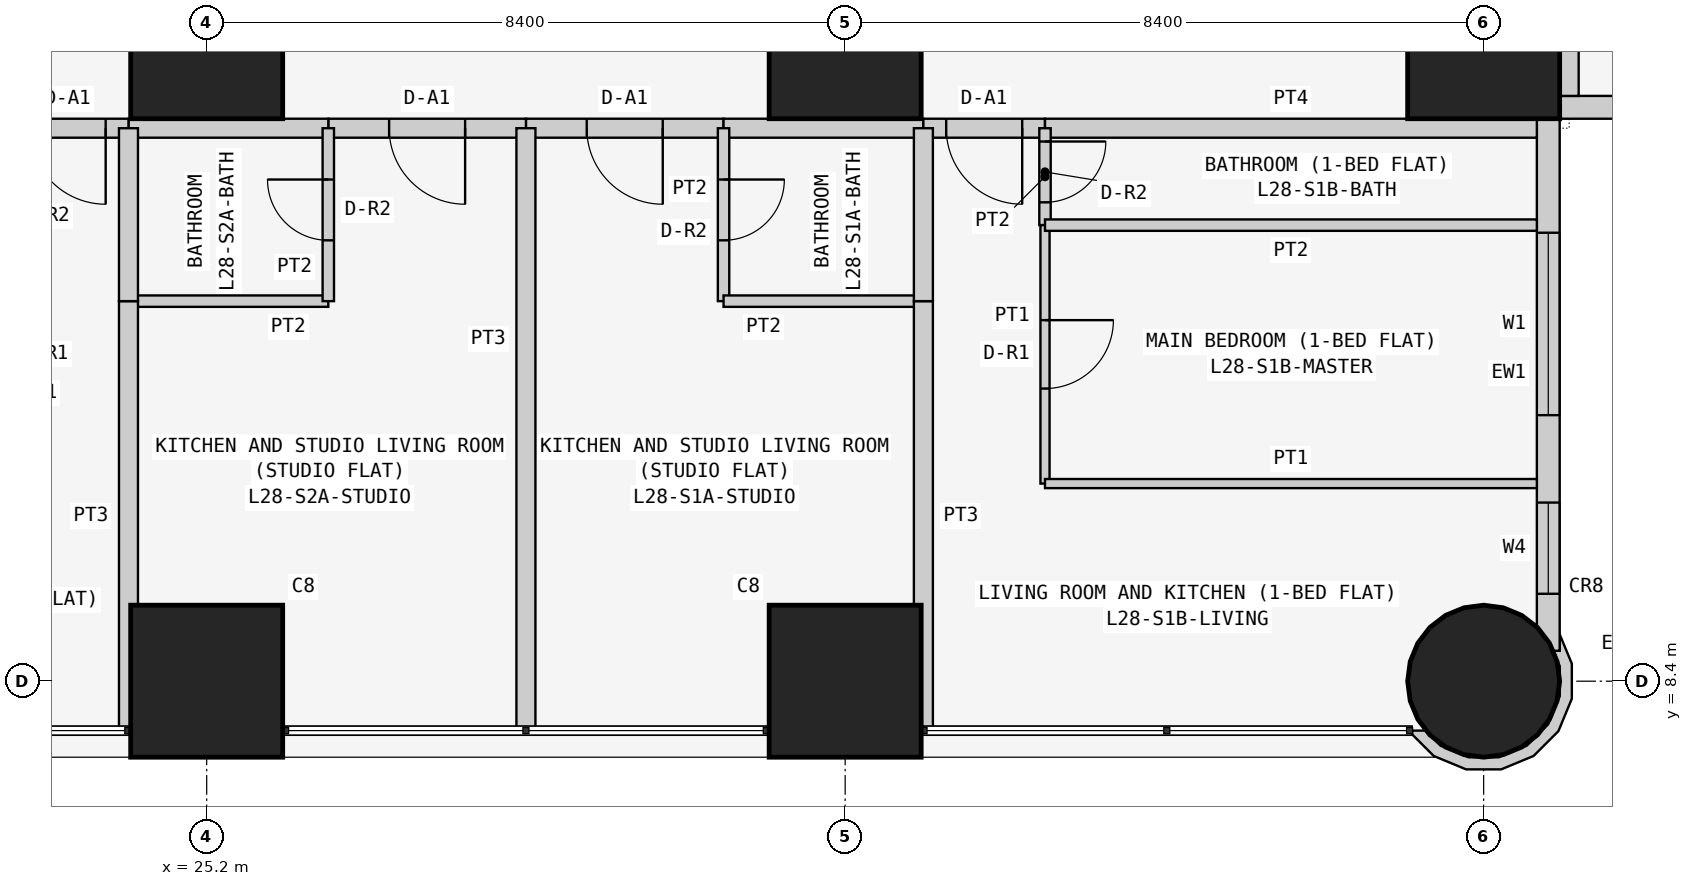
"""IFC4 building model, lengths in metres.
Left out: names, types, materials, properties, quantities, classifications, styles, units other than length and angle.
Written with IfcOpenShell. Run it as: python <this file> out.ifc"""

import sys

from ifc_helpers import new_model, si_unit, direction, frame, frame_2d, origin, origin_2d, place, context, subcontext, project, spatial, polyline, rectangle, circle, outline, extrude, element, fill, save


model = new_model("IFC4")
c1 = context("Model", 3, precision=1e-05, world=origin(), true_north=direction((0.0, 1.0)))
c2 = subcontext(c1, "Body", "Model", "MODEL_VIEW")
j1 = project(units=[si_unit("LENGTHUNIT", "METRE"), si_unit("PLANEANGLEUNIT", "RADIAN")], contexts=[c1])
p1 = place(None, origin())
s1 = spatial("IfcSite", under=j1, at=p1, CompositionType="ELEMENT")
p2 = place(p1, origin())
s2 = spatial("IfcBuilding", under=s1, at=p2, CompositionType="ELEMENT")
p3 = place(p2, frame((0.0, 0.0, 112.5)))
s3 = spatial("IfcBuildingStorey", under=s2, at=p3, CompositionType="ELEMENT", Elevation=112.5)
for number, where, z_axis, x_axis in (
    (1, (25.2, 8.4, 0.0), (0.0, 0.0, 1.0), (1.0, 0.0, 0.0)),
    (2, (25.2, 16.8, 0.0), (0.0, 0.0, 1.0), (1.0, 0.0, 0.0)),
    (3, (33.6, 8.4, 0.0), (0.0, 0.0, 1.0), (1.0, 0.0, 0.0)),
    (4, (33.6, 16.8, 0.0), (0.0, 0.0, 1.0), (1.0, 0.0, 0.0)),
):
    element("IfcColumn", number, at=place(p3, frame(where, z_axis=z_axis, x_axis=x_axis)), inside=s3, PredefinedType="COLUMN", context=c2, shape_type="SweptSolid", body=[
        extrude(rectangle(XDim=2.0, YDim=2.0, at=origin_2d()), origin(), (0.0, 0.0, 1.0), 3.6),
    ])
p4 = place(p3, frame((42.0, 8.4, 0.0), z_axis=(0.0, 0.0, 1.0), x_axis=(1.0, 0.0, 0.0)))
e5 = element("IfcColumn", 5, at=p4, inside=s3, PredefinedType="COLUMN", context=c2, shape_type="SweptSolid", body=[
    extrude(circle(Radius=1.0, at=origin_2d()), origin(), (0.0, 0.0, 1.0), 3.6),
])
p5 = place(p3, frame((42.0, 16.8, 0.0), z_axis=(0.0, 0.0, 1.0), x_axis=(1.0, 0.0, 0.0)))
e6 = element("IfcColumn", 6, at=p5, inside=s3, PredefinedType="COLUMN", context=c2, shape_type="SweptSolid", body=[
    extrude(rectangle(XDim=2.0, YDim=2.0, at=origin_2d()), origin(), (0.0, 0.0, 1.0), 3.6),
])
p6 = place(p3, frame((42.85, 8.8, 0.0), z_axis=(0.0, 0.0, 1.0), x_axis=(0.0, 1.0, 0.0)))
e7 = element("IfcWall", 7, at=p6, inside=s3, PredefinedType="SOLIDWALL", context=c2, shape_type="SweptSolid", body=[
    extrude(rectangle(XDim=7.3, YDim=0.3, at=frame_2d((3.65, 0.0))), origin(), (0.0, 0.0, 1.0), 3.45),
])
p7 = place(p6, frame((3.1, 0.0, 0.9)))
e8 = element("IfcOpeningElement", 8, at=p7, cuts=e7, PredefinedType="OPENING", context=c2, shape_type="SweptSolid", body=[
    extrude(rectangle(XDim=2.4, YDim=1.5, at=frame_2d((1.2, 0.75))), frame((0.0, 0.16, 0.0), z_axis=(0.0, -1.0, 0.0), x_axis=(1.0, 0.0, 0.0)), (0.0, 0.0, 1.0), 0.32),
])
p8 = place(p6, frame((0.75, 0.0, 0.9)))
e9 = element("IfcOpeningElement", 9, at=p8, cuts=e7, PredefinedType="OPENING", context=c2, shape_type="SweptSolid", body=[
    extrude(rectangle(XDim=1.2, YDim=1.5, at=frame_2d((0.6, 0.75))), frame((0.0, 0.16, 0.0), z_axis=(0.0, -1.0, 0.0), x_axis=(1.0, 0.0, 0.0)), (0.0, 0.0, 1.0), 0.32),
])
p9 = place(p3, frame((43.0, 15.95, 0.0), z_axis=(0.0, 0.0, 1.0), x_axis=(1.0, 0.0, 0.0)))
e10 = element("IfcWall", 10, at=p9, inside=s3, PredefinedType="SOLIDWALL", context=c2, shape_type="SweptSolid", body=[
    extrude(rectangle(XDim=15.4, YDim=0.3, at=frame_2d((7.7, 0.0))), origin(), (0.0, 0.0, 1.0), 3.45),
])
p10 = place(p9, frame((1.2, 0.0, 0.9)))
e11 = element("IfcOpeningElement", 11, at=p10, cuts=e10, PredefinedType="OPENING", context=c2, shape_type="SweptSolid", body=[
    extrude(rectangle(XDim=1.8, YDim=1.5, at=frame_2d((0.9, 0.75))), frame((0.0, 0.16, 0.0), z_axis=(0.0, -1.0, 0.0), x_axis=(1.0, 0.0, 0.0)), (0.0, 0.0, 1.0), 0.32),
])
p11 = place(p9, frame((4.95, 0.0, 1.5)))
e12 = element("IfcOpeningElement", 12, at=p11, cuts=e10, PredefinedType="OPENING", context=c2, shape_type="SweptSolid", body=[
    extrude(rectangle(XDim=0.9, YDim=0.7, at=frame_2d((0.45, 0.35))), frame((0.0, 0.16, 0.0), z_axis=(0.0, -1.0, 0.0), x_axis=(1.0, 0.0, 0.0)), (0.0, 0.0, 1.0), 0.32),
])
p12 = place(p9, frame((8.5, 0.0, 0.9)))
e13 = element("IfcOpeningElement", 13, at=p12, cuts=e10, PredefinedType="OPENING", context=c2, shape_type="SweptSolid", body=[
    extrude(rectangle(XDim=1.8, YDim=1.5, at=frame_2d((0.9, 0.75))), frame((0.0, 0.16, 0.0), z_axis=(0.0, -1.0, 0.0), x_axis=(1.0, 0.0, 0.0)), (0.0, 0.0, 1.0), 0.32),
])
p13 = place(p9, frame((12.5, 0.0, 0.0)))
e14 = element("IfcOpeningElement", 14, at=p13, cuts=e10, PredefinedType="OPENING", context=c2, shape_type="SweptSolid", body=[
    extrude(rectangle(XDim=0.9, YDim=2.4, at=frame_2d((0.45, 1.2))), frame((0.0, 0.16, 0.0), z_axis=(0.0, -1.0, 0.0), x_axis=(1.0, 0.0, 0.0)), (0.0, 0.0, 1.0), 0.32),
])
p14 = place(p9, frame((13.5, 0.0, 0.9)))
e15 = element("IfcOpeningElement", 15, at=p14, cuts=e10, PredefinedType="OPENING", context=c2, shape_type="SweptSolid", body=[
    extrude(rectangle(XDim=1.2, YDim=1.5, at=frame_2d((0.6, 0.75))), frame((0.0, 0.16, 0.0), z_axis=(0.0, -1.0, 0.0), x_axis=(1.0, 0.0, 0.0)), (0.0, 0.0, 1.0), 0.32),
])
p15 = place(p3, frame((41.132, 7.757, 0.0), z_axis=(0.0, 0.0, 1.0), x_axis=(0.555974394895, -0.831199417842, 0.0)))
e16 = element("IfcWall", 16, at=p15, inside=s3, PredefinedType="SOLIDWALL", context=c2, shape_type="SweptSolid", body=[
    extrude(outline(polyline([(0.171, 2.132), (0.113, 2.066), (0.339, 2.021), (0.67, 1.8), (0.891, 1.469), (0.968, 1.078), (0.89, 0.688), (0.669, 0.357), (0.338, 0.136), (0.062, 0.081), (-0.036, -0.066), (0.005, -0.093), (0.4, -0.014), (0.784, 0.242), (1.04, 0.626), (1.13, 1.078), (1.041, 1.531), (0.784, 1.915), (0.401, 2.171), (-0.009, 2.253), (0.171, 2.132)])), origin(), (0.0, 0.0, 1.0), 3.45),
])
p16 = place(p3, frame((43.125, 22.971, 0.0), z_axis=(0.0, 0.0, 1.0), x_axis=(0.0, -1.0, 0.0)))
e17 = element("IfcWall", 17, at=p16, inside=s3, PredefinedType="PARTITIONING", context=c2, shape_type="SweptSolid", body=[
    extrude(rectangle(XDim=6.871, YDim=0.25, at=frame_2d((3.436, 0.0))), origin(), (0.0, 0.0, 1.0), 3.45),
])
p17 = place(p3, frame((32.0, 15.675, 0.0), z_axis=(0.0, 0.0, 1.0), x_axis=(-1.0, 0.0, 0.0)))
e18 = element("IfcWall", 18, at=p17, inside=s3, PredefinedType="PARTITIONING", context=c2, shape_type="SweptSolid", body=[
    extrude(rectangle(XDim=2.6, YDim=0.25, at=frame_2d((1.3, 0.0))), origin(), (0.0, 0.0, 1.0), 3.45),
])
p18 = place(p17, frame((0.8, 0.0, 0.0)))
e19 = element("IfcOpeningElement", 19, at=p18, cuts=e18, PredefinedType="OPENING", context=c2, shape_type="SweptSolid", body=[
    extrude(rectangle(XDim=1.0, YDim=2.1, at=frame_2d((0.5, 1.05))), frame((0.0, 0.135, 0.0), z_axis=(0.0, -1.0, 0.0), x_axis=(1.0, 0.0, 0.0)), (0.0, 0.0, 1.0), 0.27),
])
p19 = place(p3, frame((34.629, 15.675, 0.0), z_axis=(0.0, 0.0, 1.0), x_axis=(-1.0, 0.0, 0.0)))
e20 = element("IfcWall", 20, at=p19, inside=s3, PredefinedType="PARTITIONING", context=c2, shape_type="SweptSolid", body=[
    extrude(rectangle(XDim=2.629, YDim=0.25, at=frame_2d((1.314, 0.0))), origin(), (0.0, 0.0, 1.0), 3.45),
])
p20 = place(p3, frame((36.229, 15.675, 0.0), z_axis=(0.0, 0.0, 1.0), x_axis=(-1.0, 0.0, 0.0)))
e21 = element("IfcWall", 21, at=p20, inside=s3, PredefinedType="PARTITIONING", context=c2, shape_type="SweptSolid", body=[
    extrude(rectangle(XDim=1.6, YDim=0.25, at=frame_2d((0.8, 0.0))), origin(), (0.0, 0.0, 1.0), 3.45),
])
p21 = place(p20, frame((0.3, 0.0, 0.0)))
e22 = element("IfcOpeningElement", 22, at=p21, cuts=e21, PredefinedType="OPENING", context=c2, shape_type="SweptSolid", body=[
    extrude(rectangle(XDim=1.0, YDim=2.1, at=frame_2d((0.5, 1.05))), frame((0.0, 0.135, 0.0), z_axis=(0.0, -1.0, 0.0), x_axis=(1.0, 0.0, 0.0)), (0.0, 0.0, 1.0), 0.27),
])
p22 = place(p3, frame((42.7, 15.675, 0.0), z_axis=(0.0, 0.0, 1.0), x_axis=(-1.0, 0.0, 0.0)))
e23 = element("IfcWall", 23, at=p22, inside=s3, PredefinedType="PARTITIONING", context=c2, shape_type="SweptSolid", body=[
    extrude(rectangle(XDim=6.471, YDim=0.25, at=frame_2d((3.235, 0.0))), origin(), (0.0, 0.0, 1.0), 3.45),
])
p23 = place(p3, frame((29.4, 15.675, 0.0), z_axis=(0.0, 0.0, 1.0), x_axis=(-1.0, 0.0, 0.0)))
e24 = element("IfcWall", 24, at=p23, inside=s3, PredefinedType="PARTITIONING", context=c2, shape_type="SweptSolid", body=[
    extrude(rectangle(XDim=2.6, YDim=0.25, at=frame_2d((1.3, 0.0))), origin(), (0.0, 0.0, 1.0), 3.45),
])
p24 = place(p23, frame((0.8, 0.0, 0.0)))
e25 = element("IfcOpeningElement", 25, at=p24, cuts=e24, PredefinedType="OPENING", context=c2, shape_type="SweptSolid", body=[
    extrude(rectangle(XDim=1.0, YDim=2.1, at=frame_2d((0.5, 1.05))), frame((0.0, 0.135, 0.0), z_axis=(0.0, -1.0, 0.0), x_axis=(1.0, 0.0, 0.0)), (0.0, 0.0, 1.0), 0.27),
])
p25 = place(p3, frame((26.8, 15.675, 0.0), z_axis=(0.0, 0.0, 1.0), x_axis=(-1.0, 0.0, 0.0)))
e26 = element("IfcWall", 26, at=p25, inside=s3, PredefinedType="PARTITIONING", context=c2, shape_type="SweptSolid", body=[
    extrude(rectangle(XDim=2.629, YDim=0.25, at=frame_2d((1.314, 0.0))), origin(), (0.0, 0.0, 1.0), 3.45),
])
p26 = place(p3, frame((24.171, 15.675, 0.0), z_axis=(0.0, 0.0, 1.0), x_axis=(-1.0, 0.0, 0.0)))
e27 = element("IfcWall", 27, at=p26, inside=s3, PredefinedType="PARTITIONING", context=c2, shape_type="SweptSolid", body=[
    extrude(rectangle(XDim=1.6, YDim=0.25, at=frame_2d((0.8, 0.0))), origin(), (0.0, 0.0, 1.0), 3.45),
])
p27 = place(p26, frame((0.3, 0.0, 0.0)))
e28 = element("IfcOpeningElement", 28, at=p27, cuts=e27, PredefinedType="OPENING", context=c2, shape_type="SweptSolid", body=[
    extrude(rectangle(XDim=1.0, YDim=2.1, at=frame_2d((0.5, 1.05))), frame((0.0, 0.135, 0.0), z_axis=(0.0, -1.0, 0.0), x_axis=(1.0, 0.0, 0.0)), (0.0, 0.0, 1.0), 0.27),
])
p28 = place(p3, frame((32.0, 15.675, 0.0), z_axis=(0.0, 0.0, 1.0), x_axis=(0.0, -1.0, 0.0)))
e29 = element("IfcWall", 29, at=p28, inside=s3, PredefinedType="PARTITIONING", context=c2, shape_type="SweptSolid", body=[
    extrude(rectangle(XDim=2.275, YDim=0.15, at=frame_2d((1.138, 0.0))), origin(), (0.0, 0.0, 1.0), 3.45),
])
p29 = place(p28, frame((0.675, 0.0, 0.0)))
e30 = element("IfcOpeningElement", 30, at=p29, cuts=e29, PredefinedType="OPENING", context=c2, shape_type="SweptSolid", body=[
    extrude(rectangle(XDim=0.8, YDim=2.1, at=frame_2d((0.4, 1.05))), frame((0.0, 0.085, 0.0), z_axis=(0.0, -1.0, 0.0), x_axis=(1.0, 0.0, 0.0)), (0.0, 0.0, 1.0), 0.17),
])
p30 = place(p3, frame((32.0, 13.4, 0.0), z_axis=(0.0, 0.0, 1.0), x_axis=(1.0, 0.0, 0.0)))
e31 = element("IfcWall", 31, at=p30, inside=s3, PredefinedType="PARTITIONING", context=c2, shape_type="SweptSolid", body=[
    extrude(rectangle(XDim=2.629, YDim=0.15, at=frame_2d((1.314, 0.0))), origin(), (0.0, 0.0, 1.0), 3.45),
])
p31 = place(p3, frame((34.629, 13.4, 0.0), z_axis=(0.0, 0.0, 1.0), x_axis=(0.0, -1.0, 0.0)))
e32 = element("IfcWall", 32, at=p31, inside=s3, PredefinedType="PARTITIONING", context=c2, shape_type="SweptSolid", body=[
    extrude(rectangle(XDim=5.65, YDim=0.25, at=frame_2d((2.825, 0.0))), origin(), (0.0, 0.0, 1.0), 3.45),
])
p32 = place(p3, frame((29.4, 7.75, 0.0), z_axis=(0.0, 0.0, 1.0), x_axis=(0.0, 1.0, 0.0)))
e33 = element("IfcWall", 33, at=p32, inside=s3, PredefinedType="PARTITIONING", context=c2, shape_type="SweptSolid", body=[
    extrude(rectangle(XDim=7.925, YDim=0.25, at=frame_2d((3.962, 0.0))), origin(), (0.0, 0.0, 1.0), 2.848),
])
p33 = place(p3, frame((34.629, 13.4, 0.0), z_axis=(0.0, 0.0, 1.0), x_axis=(0.0, 1.0, 0.0)))
e34 = element("IfcWall", 34, at=p33, inside=s3, PredefinedType="PARTITIONING", context=c2, shape_type="SweptSolid", body=[
    extrude(rectangle(XDim=2.275, YDim=0.25, at=frame_2d((1.138, 0.0))), origin(), (0.0, 0.0, 1.0), 3.45),
])
p34 = place(p3, frame((36.229, 15.675, 0.0), z_axis=(0.0, 0.0, 1.0), x_axis=(0.0, -1.0, 0.0)))
e35 = element("IfcWall", 35, at=p34, inside=s3, PredefinedType="PARTITIONING", context=c2, shape_type="SweptSolid", body=[
    extrude(rectangle(XDim=1.275, YDim=0.15, at=frame_2d((0.638, 0.0))), origin(), (0.0, 0.0, 1.0), 3.45),
])
p35 = place(p34, frame((0.175, 0.0, 0.0)))
e36 = element("IfcOpeningElement", 36, at=p35, cuts=e35, PredefinedType="OPENING", context=c2, shape_type="SweptSolid", body=[
    extrude(rectangle(XDim=0.8, YDim=2.1, at=frame_2d((0.4, 1.05))), frame((0.0, 0.085, 0.0), z_axis=(0.0, -1.0, 0.0), x_axis=(1.0, 0.0, 0.0)), (0.0, 0.0, 1.0), 0.17),
])
p36 = place(p3, frame((36.229, 14.4, 0.0), z_axis=(0.0, 0.0, 1.0), x_axis=(0.0, -1.0, 0.0)))
e37 = element("IfcWall", 37, at=p36, inside=s3, PredefinedType="PARTITIONING", context=c2, shape_type="SweptSolid", body=[
    extrude(rectangle(XDim=3.4, YDim=0.12, at=frame_2d((1.7, 0.0))), origin(), (0.0, 0.0, 1.0), 3.45),
])
p37 = place(p36, frame((1.25, 0.0, 0.0)))
e38 = element("IfcOpeningElement", 38, at=p37, cuts=e37, PredefinedType="OPENING", context=c2, shape_type="SweptSolid", body=[
    extrude(rectangle(XDim=0.9, YDim=2.1, at=frame_2d((0.45, 1.05))), frame((0.0, 0.07, 0.0), z_axis=(0.0, -1.0, 0.0), x_axis=(1.0, 0.0, 0.0)), (0.0, 0.0, 1.0), 0.14),
])
p38 = place(p3, frame((36.229, 11.0, 0.0), z_axis=(0.0, 0.0, 1.0), x_axis=(1.0, 0.0, 0.0)))
e39 = element("IfcWall", 39, at=p38, inside=s3, PredefinedType="PARTITIONING", context=c2, shape_type="SweptSolid", body=[
    extrude(rectangle(XDim=6.471, YDim=0.12, at=frame_2d((3.235, 0.0))), origin(), (0.0, 0.0, 1.0), 3.45),
])
p39 = place(p3, frame((36.229, 14.4, 0.0), z_axis=(0.0, 0.0, 1.0), x_axis=(1.0, 0.0, 0.0)))
e40 = element("IfcWall", 40, at=p39, inside=s3, PredefinedType="PARTITIONING", context=c2, shape_type="SweptSolid", body=[
    extrude(rectangle(XDim=6.471, YDim=0.15, at=frame_2d((3.235, 0.0))), origin(), (0.0, 0.0, 1.0), 3.45),
])
p40 = place(p3, frame((24.171, 13.4, 0.0), z_axis=(0.0, 0.0, 1.0), x_axis=(1.0, 0.0, 0.0)))
e41 = element("IfcWall", 41, at=p40, inside=s3, PredefinedType="PARTITIONING", context=c2, shape_type="SweptSolid", body=[
    extrude(rectangle(XDim=2.629, YDim=0.15, at=frame_2d((1.314, 0.0))), origin(), (0.0, 0.0, 1.0), 3.45),
])
p41 = place(p3, frame((26.8, 13.4, 0.0), z_axis=(0.0, 0.0, 1.0), x_axis=(0.0, 1.0, 0.0)))
e42 = element("IfcWall", 42, at=p41, inside=s3, PredefinedType="PARTITIONING", context=c2, shape_type="SweptSolid", body=[
    extrude(rectangle(XDim=2.275, YDim=0.15, at=frame_2d((1.138, 0.0))), origin(), (0.0, 0.0, 1.0), 3.45),
])
p42 = place(p41, frame((0.8, 0.0, 0.0)))
e43 = element("IfcOpeningElement", 43, at=p42, cuts=e42, PredefinedType="OPENING", context=c2, shape_type="SweptSolid", body=[
    extrude(rectangle(XDim=0.8, YDim=2.1, at=frame_2d((0.4, 1.05))), frame((0.0, 0.085, 0.0), z_axis=(0.0, -1.0, 0.0), x_axis=(1.0, 0.0, 0.0)), (0.0, 0.0, 1.0), 0.17),
])
p43 = place(p3, frame((24.171, 7.75, 0.0), z_axis=(0.0, 0.0, 1.0), x_axis=(0.0, 1.0, 0.0)))
e44 = element("IfcWall", 44, at=p43, inside=s3, PredefinedType="PARTITIONING", context=c2, shape_type="SweptSolid", body=[
    extrude(rectangle(XDim=5.65, YDim=0.25, at=frame_2d((2.825, 0.0))), origin(), (0.0, 0.0, 1.0), 3.45),
])
p44 = place(p3, frame((24.171, 13.4, 0.0), z_axis=(0.0, 0.0, 1.0), x_axis=(0.0, 1.0, 0.0)))
e45 = element("IfcWall", 45, at=p44, inside=s3, PredefinedType="PARTITIONING", context=c2, shape_type="SweptSolid", body=[
    extrude(rectangle(XDim=2.275, YDim=0.25, at=frame_2d((1.138, 0.0))), origin(), (0.0, 0.0, 1.0), 3.45),
])
p45 = place(p7, origin())
e46 = element("IfcWindow", 46, at=p45, inside=s3, PartitioningType="SINGLE_PANEL", PredefinedType="WINDOW", context=c2, shape_type="SweptSolid", body=[
    extrude(rectangle(XDim=2.4, YDim=1.5, at=frame_2d((1.2, 0.75))), frame((0.0, 0.03, 0.0), z_axis=(0.0, -1.0, 0.0), x_axis=(1.0, 0.0, 0.0)), (0.0, 0.0, 1.0), 0.06),
])
fill(e8, e46)
p46 = place(p8, origin())
e47 = element("IfcWindow", 47, at=p46, inside=s3, PartitioningType="SINGLE_PANEL", PredefinedType="WINDOW", context=c2, shape_type="SweptSolid", body=[
    extrude(rectangle(XDim=1.2, YDim=1.5, at=frame_2d((0.6, 0.75))), frame((0.0, 0.03, 0.0), z_axis=(0.0, -1.0, 0.0), x_axis=(1.0, 0.0, 0.0)), (0.0, 0.0, 1.0), 0.06),
])
fill(e9, e47)
p47 = place(p18, origin())
e48 = element("IfcDoor", 48, at=p47, inside=s3, OperationType="SINGLE_SWING_LEFT", PredefinedType="DOOR", context=c2, shape_type="SweptSolid", body=[
    extrude(rectangle(XDim=1.0, YDim=2.1, at=frame_2d((0.5, 1.05))), frame((0.0, 0.025, 0.0), z_axis=(0.0, -1.0, 0.0), x_axis=(1.0, 0.0, 0.0)), (0.0, 0.0, 1.0), 0.05),
])
fill(e19, e48)
p48 = place(p29, origin())
e49 = element("IfcDoor", 49, at=p48, inside=s3, OperationType="SINGLE_SWING_LEFT", PredefinedType="DOOR", context=c2, shape_type="SweptSolid", body=[
    extrude(rectangle(XDim=0.8, YDim=2.1, at=frame_2d((0.4, 1.05))), frame((0.0, 0.025, 0.0), z_axis=(0.0, -1.0, 0.0), x_axis=(1.0, 0.0, 0.0)), (0.0, 0.0, 1.0), 0.05),
])
fill(e30, e49)
p49 = place(p21, origin())
e50 = element("IfcDoor", 50, at=p49, inside=s3, OperationType="SINGLE_SWING_LEFT", PredefinedType="DOOR", context=c2, shape_type="SweptSolid", body=[
    extrude(rectangle(XDim=1.0, YDim=2.1, at=frame_2d((0.5, 1.05))), frame((0.0, 0.025, 0.0), z_axis=(0.0, -1.0, 0.0), x_axis=(1.0, 0.0, 0.0)), (0.0, 0.0, 1.0), 0.05),
])
fill(e22, e50)
p50 = place(p35, origin())
e51 = element("IfcDoor", 51, at=p50, inside=s3, OperationType="SINGLE_SWING_LEFT", PredefinedType="DOOR", context=c2, shape_type="SweptSolid", body=[
    extrude(rectangle(XDim=0.8, YDim=2.1, at=frame_2d((0.4, 1.05))), frame((0.0, 0.025, 0.0), z_axis=(0.0, -1.0, 0.0), x_axis=(1.0, 0.0, 0.0)), (0.0, 0.0, 1.0), 0.05),
])
fill(e36, e51)
p51 = place(p37, origin())
e52 = element("IfcDoor", 52, at=p51, inside=s3, OperationType="SINGLE_SWING_LEFT", PredefinedType="DOOR", context=c2, shape_type="SweptSolid", body=[
    extrude(rectangle(XDim=0.9, YDim=2.1, at=frame_2d((0.45, 1.05))), frame((0.0, 0.025, 0.0), z_axis=(0.0, -1.0, 0.0), x_axis=(1.0, 0.0, 0.0)), (0.0, 0.0, 1.0), 0.05),
])
fill(e38, e52)
p52 = place(p24, origin())
e53 = element("IfcDoor", 53, at=p52, inside=s3, OperationType="SINGLE_SWING_LEFT", PredefinedType="DOOR", context=c2, shape_type="SweptSolid", body=[
    extrude(rectangle(XDim=1.0, YDim=2.1, at=frame_2d((0.5, 1.05))), frame((0.0, 0.025, 0.0), z_axis=(0.0, -1.0, 0.0), x_axis=(1.0, 0.0, 0.0)), (0.0, 0.0, 1.0), 0.05),
])
fill(e25, e53)
p53 = place(p42, origin())
e54 = element("IfcDoor", 54, at=p53, inside=s3, OperationType="SINGLE_SWING_RIGHT", PredefinedType="DOOR", context=c2, shape_type="SweptSolid", body=[
    extrude(rectangle(XDim=0.8, YDim=2.1, at=frame_2d((0.4, 1.05))), frame((0.0, 0.025, 0.0), z_axis=(0.0, -1.0, 0.0), x_axis=(1.0, 0.0, 0.0)), (0.0, 0.0, 1.0), 0.05),
])
fill(e43, e54)
p54 = place(p27, origin())
e55 = element("IfcDoor", 55, at=p54, inside=s3, OperationType="SINGLE_SWING_LEFT", PredefinedType="DOOR", context=c2, shape_type="SweptSolid", body=[
    extrude(rectangle(XDim=1.0, YDim=2.1, at=frame_2d((0.5, 1.05))), frame((0.0, 0.025, 0.0), z_axis=(0.0, -1.0, 0.0), x_axis=(1.0, 0.0, 0.0)), (0.0, 0.0, 1.0), 0.05),
])
fill(e28, e55)
save(model, sys.argv[1])
